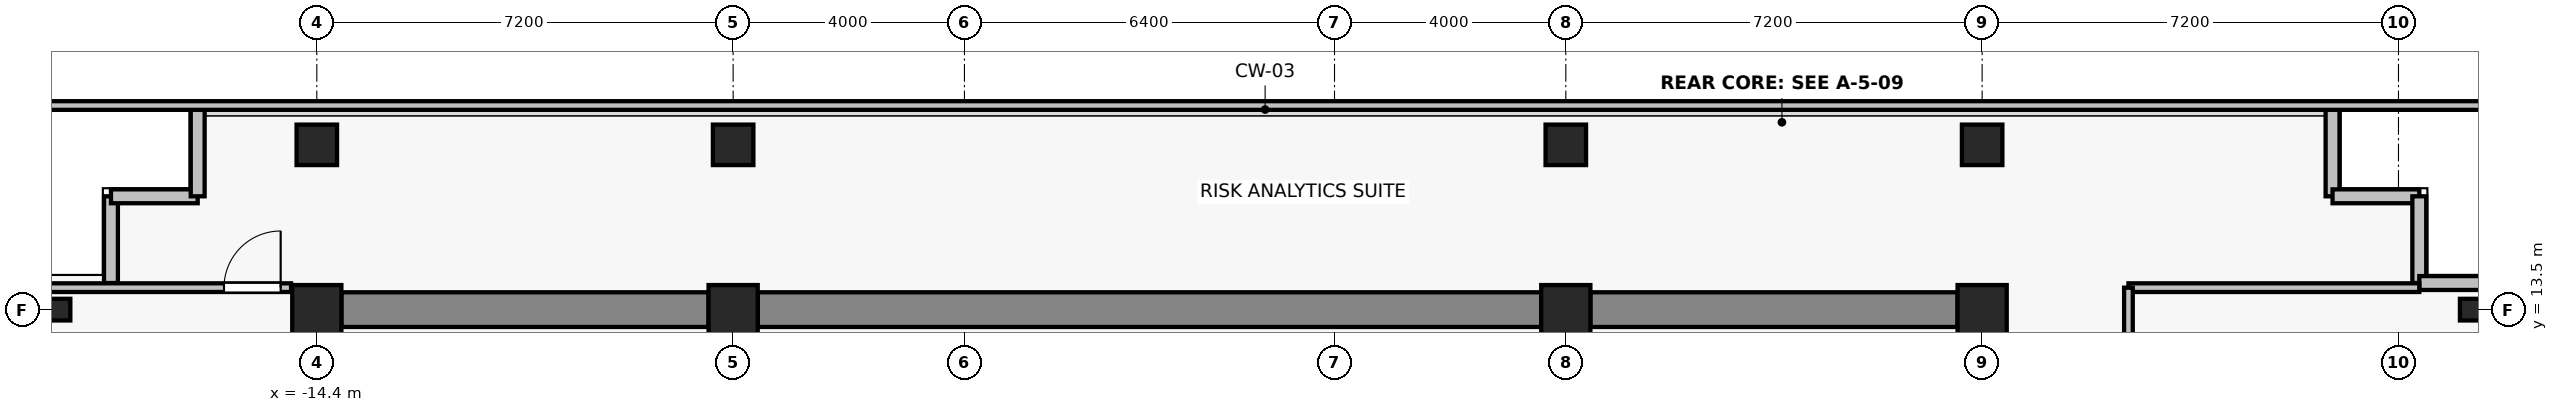
"""IFC4 building model, lengths in metres.
Left out: names, types, materials, properties, quantities, classifications, styles, units other than length and angle.
Written with IfcOpenShell. Run it as: python <this file> out.ifc"""

import sys

from ifc_helpers import new_model, si_unit, direction, frame, frame_2d, origin, origin_2d, place, context, subcontext, project, spatial, rectangle, i_section, extrude, source, transform, mapped, element, fill, save


model = new_model("IFC4")
c1 = context("Model", 3, precision=1e-05, world=origin(), true_north=direction((0.0, 1.0)))
c2 = subcontext(c1, "Body", "Model", "MODEL_VIEW")
j1 = project(units=[si_unit("LENGTHUNIT", "METRE"), si_unit("PLANEANGLEUNIT", "RADIAN")], contexts=[c1])
p1 = place(None, origin())
s1 = spatial("IfcSite", under=j1, at=p1, CompositionType="ELEMENT")
p2 = place(p1, origin())
s2 = spatial("IfcBuilding", under=s1, at=p2, CompositionType="ELEMENT")
p3 = place(p2, frame((0.0, 0.0, 248.5)))
s3 = spatial("IfcBuildingStorey", under=s2, at=p3, CompositionType="ELEMENT", Elevation=248.5)
for number, where, z_axis, x_axis in (
    (1, (-14.4, 13.5, 0.0), (0.0, 0.0, 1.0), (1.0, 0.0, 0.0)),
    (2, (-7.2, 13.5, 0.0), (0.0, 0.0, 1.0), (1.0, 0.0, 0.0)),
    (3, (7.2, 13.5, 0.0), (0.0, 0.0, 1.0), (1.0, 0.0, 0.0)),
    (4, (14.4, 13.5, 0.0), (0.0, 0.0, 1.0), (1.0, 0.0, 0.0)),
):
    element("IfcColumn", number, at=place(p3, frame(where, z_axis=z_axis, x_axis=x_axis)), inside=s3, PredefinedType="COLUMN", context=c2, shape_type="SweptSolid", body=[
        extrude(rectangle(XDim=0.85, YDim=0.85, at=origin_2d()), origin(), (0.0, 0.0, 1.0), 3.3),
    ])
for number, where, z_axis, x_axis in (
    (5, (-14.4, 16.35, 0.0), (0.0, 0.0, 1.0), (1.0, 0.0, 0.0)),
    (6, (-7.2, 16.35, 0.0), (0.0, 0.0, 1.0), (1.0, 0.0, 0.0)),
    (7, (7.2, 16.35, 0.0), (0.0, 0.0, 1.0), (1.0, 0.0, 0.0)),
    (8, (14.4, 16.35, 0.0), (0.0, 0.0, 1.0), (1.0, 0.0, 0.0)),
):
    element("IfcColumn", number, at=place(p3, frame(where, z_axis=z_axis, x_axis=x_axis)), inside=s3, PredefinedType="COLUMN", context=c2, shape_type="SweptSolid", body=[
        extrude(rectangle(XDim=0.7, YDim=0.7, at=origin_2d()), origin(), (0.0, 0.0, 1.0), 3.3),
    ])
for number, where, z_axis, x_axis in (
    (9, (-18.85, 13.5, 0.0), (0.0, 0.0, 1.0), (1.0, 0.0, 0.0)),
    (10, (22.85, 13.5, 0.0), (0.0, 0.0, 1.0), (1.0, 0.0, 0.0)),
):
    element("IfcColumn", number, at=place(p3, frame(where, z_axis=z_axis, x_axis=x_axis)), inside=s3, PredefinedType="COLUMN", context=c2, shape_type="SweptSolid", body=[
        extrude(i_section(OverallWidth=0.375, OverallDepth=0.375, WebThickness=0.017, FlangeThickness=0.027, FilletRadius=0.015, at=origin_2d()), origin(), (0.0, 0.0, 1.0), 3.3),
    ])
p4 = place(p3, frame((-13.975, 13.5, 0.0), z_axis=(0.0, 0.0, 1.0), x_axis=(1.0, 0.0, 0.0)))
e11 = element("IfcWall", 11, at=p4, inside=s3, PredefinedType="SHEAR", context=c2, shape_type="SweptSolid", body=[
    extrude(rectangle(XDim=6.35, YDim=0.6, at=frame_2d((3.175, 0.0))), origin(), (0.0, 0.0, 1.0), 3.075),
])
p5 = place(p3, frame((-6.775, 13.5, 0.0), z_axis=(0.0, 0.0, 1.0), x_axis=(1.0, 0.0, 0.0)))
e12 = element("IfcWall", 12, at=p5, inside=s3, PredefinedType="SHEAR", context=c2, shape_type="SweptSolid", body=[
    extrude(rectangle(XDim=13.55, YDim=0.6, at=frame_2d((6.775, 0.0))), origin(), (0.0, 0.0, 1.0), 3.075),
])
p6 = place(p3, frame((7.625, 13.5, 0.0), z_axis=(0.0, 0.0, 1.0), x_axis=(1.0, 0.0, 0.0)))
e13 = element("IfcWall", 13, at=p6, inside=s3, PredefinedType="SHEAR", context=c2, shape_type="SweptSolid", body=[
    extrude(rectangle(XDim=6.35, YDim=0.6, at=frame_2d((3.175, 0.0))), origin(), (0.0, 0.0, 1.0), 3.075),
])
for number, where, z_axis, x_axis in (
    (14, (-17.96, 15.46, 0.0), (0.0, 0.0, 1.0), (0.0, -1.0, 0.0)),
    (15, (-16.46, 15.46, 0.0), (0.0, 0.0, 1.0), (-1.0, 0.0, 0.0)),
    (16, (-16.46, 16.96, 0.0), (0.0, 0.0, 1.0), (0.0, -1.0, 0.0)),
    (17, (20.46, 15.46, 0.0), (0.0, 0.0, 1.0), (0.0, 1.0, 0.0)),
    (18, (21.96, 15.46, 0.0), (0.0, 0.0, 1.0), (-1.0, 0.0, 0.0)),
    (19, (21.96, 13.96, 0.0), (0.0, 0.0, 1.0), (0.0, 1.0, 0.0)),
    (20, (23.46, 13.96, 0.0), (0.0, 0.0, 1.0), (-1.0, 0.0, 0.0)),
):
    element("IfcWall", number, at=place(p3, frame(where, z_axis=z_axis, x_axis=x_axis)), inside=s3, PredefinedType="SOLIDWALL", context=c2, shape_type="SweptSolid", body=[
        extrude(rectangle(XDim=1.5, YDim=0.24, at=frame_2d((0.75, 0.0))), origin(), (0.0, 0.0, 1.0), 3.075),
    ])
p7 = place(p3, frame((-19.53, 13.88, 0.0), z_axis=(0.0, 0.0, 1.0), x_axis=(1.0, 0.0, 0.0)))
e21 = element("IfcWall", 21, at=p7, inside=s3, PredefinedType="PARTITIONING", context=c2, shape_type="SweptSolid", body=[
    extrude(rectangle(XDim=4.685, YDim=0.15, at=frame_2d((2.343, 0.0))), origin(), (0.0, 0.0, 1.0), 3.075),
])
p8 = place(p7, frame((3.525, 0.0, 0.0)))
e22 = element("IfcOpeningElement", 22, at=p8, cuts=e21, PredefinedType="OPENING", context=c2, shape_type="SweptSolid", body=[
    extrude(rectangle(XDim=0.98, YDim=2.15, at=frame_2d((0.49, 1.075))), frame((0.0, 0.085, 0.0), z_axis=(0.0, -1.0, 0.0), x_axis=(1.0, 0.0, 0.0)), (0.0, 0.0, 1.0), 0.17),
])
p9 = place(p3, frame((16.93, 13.88, 0.0), z_axis=(0.0, 0.0, 1.0), x_axis=(1.0, 0.0, 0.0)))
e23 = element("IfcWall", 23, at=p9, inside=s3, PredefinedType="PARTITIONING", context=c2, shape_type="SweptSolid", body=[
    extrude(rectangle(XDim=5.03, YDim=0.15, at=frame_2d((2.515, 0.0))), origin(), (0.0, 0.0, 1.0), 3.075),
])
p10 = place(p3, frame((16.93, -1.77, 0.0), z_axis=(0.0, 0.0, 1.0), x_axis=(0.0, 1.0, 0.0)))
e24 = element("IfcWall", 24, at=p10, inside=s3, PredefinedType="PARTITIONING", context=c2, shape_type="SweptSolid", body=[
    extrude(rectangle(XDim=15.65, YDim=0.15, at=frame_2d((7.825, 0.0))), origin(), (0.0, 0.0, 1.0), 2.615),
])
p11 = place(p10, frame((7.335, 0.0, 0.0)))
e25 = element("IfcOpeningElement", 25, at=p11, cuts=e24, PredefinedType="OPENING", context=c2, shape_type="SweptSolid", body=[
    extrude(rectangle(XDim=0.98, YDim=2.15, at=frame_2d((0.49, 1.075))), frame((0.0, 0.085, 0.0), z_axis=(0.0, -1.0, 0.0), x_axis=(1.0, 0.0, 0.0)), (0.0, 0.0, 1.0), 0.17),
])
p12 = place(p3, frame((-19.53, 17.03, 0.0), z_axis=(0.0, 0.0, 1.0), x_axis=(1.0, 0.0, 0.0)))
e26 = element("IfcWall", 26, at=p12, inside=s3, PredefinedType="PARTITIONING", context=c2, shape_type="SweptSolid", body=[
    extrude(rectangle(XDim=43.06, YDim=0.15, at=frame_2d((21.53, 0.0))), origin(), (0.0, 0.0, 1.0), 3.075),
])
m1 = source(origin(), c2, "Body", "SweptSolid", [
    extrude(rectangle(XDim=0.98, YDim=2.15, at=frame_2d((0.49, 1.075))), frame((0.0, 0.025, 0.0), z_axis=(0.0, -1.0, 0.0), x_axis=(1.0, 0.0, 0.0)), (0.0, 0.0, 1.0), 0.05),
])
p13 = place(p8, origin())
e27 = element("IfcDoor", 27, at=p13, inside=s3, OperationType="SINGLE_SWING_RIGHT", PredefinedType="DOOR", context=c2, shape_type="MappedRepresentation", body=[
    mapped(m1, transform((0.0, 0.0, 0.0), x_axis=(1.0, 0.0, 0.0), y_axis=(0.0, 1.0, 0.0), z_axis=(0.0, 0.0, 1.0), scale=1.0)),
])
fill(e22, e27)
save(model, sys.argv[1])
